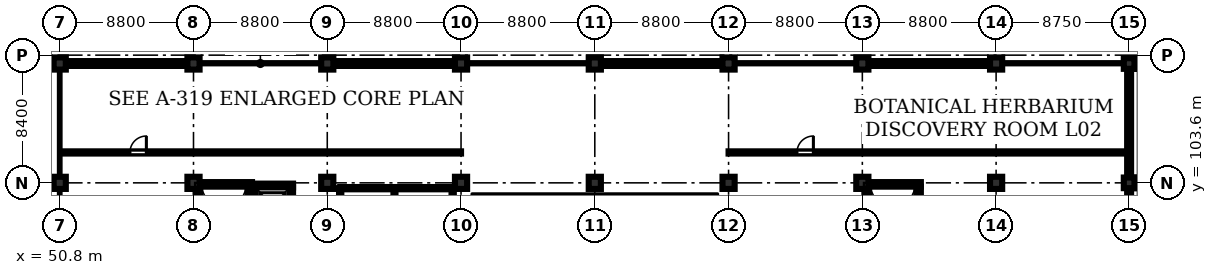
"""IFC4 building model, lengths in metres.
Left out: names, types, materials, properties, quantities, classifications, styles, units other than length and angle.
Written with IfcOpenShell. Run it as: python <this file> out.ifc"""

import sys

from ifc_helpers import new_model, si_unit, direction, frame, frame_2d, origin, origin_2d, place, context, subcontext, project, spatial, rectangle, extrude, element, fill, save


model = new_model("IFC4")
c1 = context("Model", 3, precision=1e-05, world=origin(), true_north=direction((0.0, 1.0)))
c2 = subcontext(c1, "Body", "Model", "MODEL_VIEW")
j1 = project(units=[si_unit("LENGTHUNIT", "METRE"), si_unit("PLANEANGLEUNIT", "RADIAN")], contexts=[c1])
p1 = place(None, origin())
s1 = spatial("IfcSite", under=j1, at=p1, CompositionType="ELEMENT")
p2 = place(p1, origin())
s2 = spatial("IfcBuilding", under=s1, at=p2, CompositionType="ELEMENT")
p3 = place(p2, frame((0.0, 0.0, 5.4)))
s3 = spatial("IfcBuildingStorey", under=s2, at=p3, CompositionType="ELEMENT", Elevation=5.4)
for number, where, z_axis, x_axis in (
    (1, (50.8, 103.6, 0.0), (0.0, 0.0, 1.0), (1.0, 0.0, 0.0)),
    (2, (50.8, 111.45, 0.0), (0.0, 0.0, 1.0), (1.0, 0.0, 0.0)),
    (3, (59.6, 103.6, 0.0), (0.0, 0.0, 1.0), (1.0, 0.0, 0.0)),
    (4, (59.6, 111.45, 0.0), (0.0, 0.0, 1.0), (1.0, 0.0, 0.0)),
    (5, (68.4, 103.6, 0.0), (0.0, 0.0, 1.0), (1.0, 0.0, 0.0)),
    (6, (68.4, 111.45, 0.0), (0.0, 0.0, 1.0), (1.0, 0.0, 0.0)),
    (7, (77.2, 103.6, 0.0), (0.0, 0.0, 1.0), (1.0, 0.0, 0.0)),
    (8, (77.2, 111.45, 0.0), (0.0, 0.0, 1.0), (1.0, 0.0, 0.0)),
    (9, (86.0, 103.6, 0.0), (0.0, 0.0, 1.0), (1.0, 0.0, 0.0)),
    (10, (86.0, 111.45, 0.0), (0.0, 0.0, 1.0), (1.0, 0.0, 0.0)),
    (11, (94.8, 103.6, 0.0), (0.0, 0.0, 1.0), (1.0, 0.0, 0.0)),
    (12, (94.8, 111.45, 0.0), (0.0, 0.0, 1.0), (1.0, 0.0, 0.0)),
    (13, (103.6, 103.6, 0.0), (0.0, 0.0, 1.0), (1.0, 0.0, 0.0)),
    (14, (103.6, 111.45, 0.0), (0.0, 0.0, 1.0), (1.0, 0.0, 0.0)),
    (15, (112.4, 103.6, 0.0), (0.0, 0.0, 1.0), (1.0, 0.0, 0.0)),
    (16, (112.4, 111.45, 0.0), (0.0, 0.0, 1.0), (1.0, 0.0, 0.0)),
):
    element("IfcColumn", number, at=place(p3, frame(where, z_axis=z_axis, x_axis=x_axis)), inside=s3, PredefinedType="COLUMN", context=c2, shape_type="SweptSolid", body=[
        extrude(rectangle(XDim=0.8, YDim=0.8, at=origin_2d()), origin(), (0.0, 0.0, 1.0), 4.58),
    ])
for number, where, z_axis, x_axis in (
    (17, (121.15, 103.6, 0.0), (0.0, 0.0, 1.0), (1.0, 0.0, 0.0)),
    (18, (121.15, 111.45, 0.0), (0.0, 0.0, 1.0), (1.0, 0.0, 0.0)),
    (19, (122.0, 103.6, 0.0), (0.0, 0.0, 1.0), (1.0, 0.0, 0.0)),
    (20, (122.0, 111.45, 0.0), (0.0, 0.0, 1.0), (1.0, 0.0, 0.0)),
):
    element("IfcColumn", number, at=place(p3, frame(where, z_axis=z_axis, x_axis=x_axis)), inside=s3, PredefinedType="COLUMN", context=c2, shape_type="SweptSolid", body=[
        extrude(rectangle(XDim=0.7, YDim=0.7, at=origin_2d()), origin(), (0.0, 0.0, 1.0), 4.58),
    ])
p4 = place(p3, frame((59.75, 103.5, 0.0), z_axis=(0.0, 0.0, 1.0), x_axis=(1.0, 0.0, 0.0)))
e21 = element("IfcWall", 21, at=p4, inside=s3, PredefinedType="SHEAR", context=c2, shape_type="SweptSolid", body=[
    extrude(rectangle(XDim=3.7, YDim=0.3, at=frame_2d((1.85, 0.0))), origin(), (0.0, 0.0, 1.0), 4.58),
])
for number, where, z_axis, x_axis in (
    (22, (59.9, 95.45, 0.0), (0.0, 0.0, 1.0), (0.0, 1.0, 0.0)),
    (23, (63.3, 95.45, 0.0), (0.0, 0.0, 1.0), (0.0, 1.0, 0.0)),
):
    element("IfcWall", number, at=place(p3, frame(where, z_axis=z_axis, x_axis=x_axis)), inside=s3, PredefinedType="SHEAR", context=c2, shape_type="SweptSolid", body=[
        extrude(rectangle(XDim=7.9, YDim=0.3, at=frame_2d((3.95, 0.0))), origin(), (0.0, 0.0, 1.0), 4.58),
    ])
p5 = place(p3, frame((103.75, 103.5, 0.0), z_axis=(0.0, 0.0, 1.0), x_axis=(1.0, 0.0, 0.0)))
e24 = element("IfcWall", 24, at=p5, inside=s3, PredefinedType="SHEAR", context=c2, shape_type="SweptSolid", body=[
    extrude(rectangle(XDim=3.7, YDim=0.3, at=frame_2d((1.85, 0.0))), origin(), (0.0, 0.0, 1.0), 4.58),
])
for number, where, z_axis, x_axis in (
    (25, (103.9, 95.45, 0.0), (0.0, 0.0, 1.0), (0.0, 1.0, 0.0)),
    (26, (107.3, 95.45, 0.0), (0.0, 0.0, 1.0), (0.0, 1.0, 0.0)),
):
    element("IfcWall", number, at=place(p3, frame(where, z_axis=z_axis, x_axis=x_axis)), inside=s3, PredefinedType="SHEAR", context=c2, shape_type="SweptSolid", body=[
        extrude(rectangle(XDim=7.9, YDim=0.3, at=frame_2d((3.95, 0.0))), origin(), (0.0, 0.0, 1.0), 4.58),
    ])
p6 = place(p3, frame((63.45, 103.425, 0.0), z_axis=(0.0, 0.0, 1.0), x_axis=(1.0, 0.0, 0.0)))
e27 = element("IfcWall", 27, at=p6, inside=s3, PredefinedType="SHEAR", context=c2, shape_type="SweptSolid", body=[
    extrude(rectangle(XDim=2.7, YDim=0.25, at=frame_2d((1.35, 0.0))), origin(), (0.0, 0.0, 1.0), 4.58),
])
for number, where, z_axis, x_axis in (
    (28, (63.575, 100.8, 0.0), (0.0, 0.0, 1.0), (0.0, 1.0, 0.0)),
    (29, (66.025, 100.8, 0.0), (0.0, 0.0, 1.0), (0.0, 1.0, 0.0)),
):
    element("IfcWall", number, at=place(p3, frame(where, z_axis=z_axis, x_axis=x_axis)), inside=s3, PredefinedType="SHEAR", context=c2, shape_type="SweptSolid", body=[
        extrude(rectangle(XDim=2.5, YDim=0.25, at=frame_2d((1.25, 0.0))), origin(), (0.0, 0.0, 1.0), 4.58),
    ])
p7 = place(p3, frame((51.2, 111.45, 0.0), z_axis=(0.0, 0.0, 1.0), x_axis=(1.0, 0.0, 0.0)))
e30 = element("IfcWall", 30, at=p7, inside=s3, PredefinedType="STANDARD", context=c2, shape_type="SweptSolid", body=[
    extrude(rectangle(XDim=8.0, YDim=0.32, at=frame_2d((4.0, 0.0))), origin(), (0.0, 0.0, 1.0), 3.83),
])
p8 = place(p7, frame((1.1, 0.0, 0.9)))
e31 = element("IfcOpeningElement", 31, at=p8, cuts=e30, PredefinedType="OPENING", context=c2, shape_type="SweptSolid", body=[
    extrude(rectangle(XDim=2.4, YDim=2.2, at=frame_2d((1.2, 1.1))), frame((0.0, 0.17, 0.0), z_axis=(0.0, -1.0, 0.0), x_axis=(1.0, 0.0, 0.0)), (0.0, 0.0, 1.0), 0.34),
])
p9 = place(p7, frame((4.7, 0.0, 0.9)))
e32 = element("IfcOpeningElement", 32, at=p9, cuts=e30, PredefinedType="OPENING", context=c2, shape_type="SweptSolid", body=[
    extrude(rectangle(XDim=2.4, YDim=2.2, at=frame_2d((1.2, 1.1))), frame((0.0, 0.17, 0.0), z_axis=(0.0, -1.0, 0.0), x_axis=(1.0, 0.0, 0.0)), (0.0, 0.0, 1.0), 0.34),
])
p10 = place(p3, frame((68.8, 111.45, 0.0), z_axis=(0.0, 0.0, 1.0), x_axis=(1.0, 0.0, 0.0)))
e33 = element("IfcWall", 33, at=p10, inside=s3, PredefinedType="STANDARD", context=c2, shape_type="SweptSolid", body=[
    extrude(rectangle(XDim=8.0, YDim=0.32, at=frame_2d((4.0, 0.0))), origin(), (0.0, 0.0, 1.0), 3.83),
])
p11 = place(p10, frame((1.1, 0.0, 0.9)))
e34 = element("IfcOpeningElement", 34, at=p11, cuts=e33, PredefinedType="OPENING", context=c2, shape_type="SweptSolid", body=[
    extrude(rectangle(XDim=2.4, YDim=2.2, at=frame_2d((1.2, 1.1))), frame((0.0, 0.17, 0.0), z_axis=(0.0, -1.0, 0.0), x_axis=(1.0, 0.0, 0.0)), (0.0, 0.0, 1.0), 0.34),
])
p12 = place(p10, frame((4.7, 0.0, 0.9)))
e35 = element("IfcOpeningElement", 35, at=p12, cuts=e33, PredefinedType="OPENING", context=c2, shape_type="SweptSolid", body=[
    extrude(rectangle(XDim=2.4, YDim=2.2, at=frame_2d((1.2, 1.1))), frame((0.0, 0.17, 0.0), z_axis=(0.0, -1.0, 0.0), x_axis=(1.0, 0.0, 0.0)), (0.0, 0.0, 1.0), 0.34),
])
p13 = place(p3, frame((86.4, 111.45, 0.0), z_axis=(0.0, 0.0, 1.0), x_axis=(1.0, 0.0, 0.0)))
e36 = element("IfcWall", 36, at=p13, inside=s3, PredefinedType="STANDARD", context=c2, shape_type="SweptSolid", body=[
    extrude(rectangle(XDim=8.0, YDim=0.32, at=frame_2d((4.0, 0.0))), origin(), (0.0, 0.0, 1.0), 3.83),
])
p14 = place(p13, frame((1.1, 0.0, 0.9)))
e37 = element("IfcOpeningElement", 37, at=p14, cuts=e36, PredefinedType="OPENING", context=c2, shape_type="SweptSolid", body=[
    extrude(rectangle(XDim=2.4, YDim=2.2, at=frame_2d((1.2, 1.1))), frame((0.0, 0.17, 0.0), z_axis=(0.0, -1.0, 0.0), x_axis=(1.0, 0.0, 0.0)), (0.0, 0.0, 1.0), 0.34),
])
p15 = place(p13, frame((4.7, 0.0, 0.9)))
e38 = element("IfcOpeningElement", 38, at=p15, cuts=e36, PredefinedType="OPENING", context=c2, shape_type="SweptSolid", body=[
    extrude(rectangle(XDim=2.4, YDim=2.2, at=frame_2d((1.2, 1.1))), frame((0.0, 0.17, 0.0), z_axis=(0.0, -1.0, 0.0), x_axis=(1.0, 0.0, 0.0)), (0.0, 0.0, 1.0), 0.34),
])
p16 = place(p3, frame((104.0, 111.45, 0.0), z_axis=(0.0, 0.0, 1.0), x_axis=(1.0, 0.0, 0.0)))
e39 = element("IfcWall", 39, at=p16, inside=s3, PredefinedType="STANDARD", context=c2, shape_type="SweptSolid", body=[
    extrude(rectangle(XDim=8.0, YDim=0.32, at=frame_2d((4.0, 0.0))), origin(), (0.0, 0.0, 1.0), 3.83),
])
p17 = place(p16, frame((1.1, 0.0, 0.9)))
e40 = element("IfcOpeningElement", 40, at=p17, cuts=e39, PredefinedType="OPENING", context=c2, shape_type="SweptSolid", body=[
    extrude(rectangle(XDim=2.4, YDim=2.2, at=frame_2d((1.2, 1.1))), frame((0.0, 0.17, 0.0), z_axis=(0.0, -1.0, 0.0), x_axis=(1.0, 0.0, 0.0)), (0.0, 0.0, 1.0), 0.34),
])
p18 = place(p16, frame((4.7, 0.0, 0.9)))
e41 = element("IfcOpeningElement", 41, at=p18, cuts=e39, PredefinedType="OPENING", context=c2, shape_type="SweptSolid", body=[
    extrude(rectangle(XDim=2.4, YDim=2.2, at=frame_2d((1.2, 1.1))), frame((0.0, 0.17, 0.0), z_axis=(0.0, -1.0, 0.0), x_axis=(1.0, 0.0, 0.0)), (0.0, 0.0, 1.0), 0.34),
])
p19 = place(p3, frame((121.15, 103.25, 0.0), z_axis=(0.0, 0.0, 1.0), x_axis=(0.0, -1.0, 0.0)))
e42 = element("IfcWall", 42, at=p19, inside=s3, PredefinedType="STANDARD", context=c2, shape_type="SweptSolid", body=[
    extrude(rectangle(XDim=7.7, YDim=0.26, at=frame_2d((3.85, 0.0))), origin(), (0.0, 0.0, 1.0), 3.93),
])
p20 = place(p3, frame((121.15, 111.1, 0.0), z_axis=(0.0, 0.0, 1.0), x_axis=(0.0, -1.0, 0.0)))
e43 = element("IfcWall", 43, at=p20, inside=s3, PredefinedType="STANDARD", context=c2, shape_type="SweptSolid", body=[
    extrude(rectangle(XDim=7.15, YDim=0.26, at=frame_2d((3.575, 0.0))), origin(), (0.0, 0.0, 1.0), 3.93),
])
p21 = place(p3, frame((69.25, 94.68, 0.0), z_axis=(0.0, 0.0, 1.0), x_axis=(0.0, 1.0, 0.0)))
e44 = element("IfcWall", 44, at=p21, inside=s3, PredefinedType="PARTITIONING", context=c2, shape_type="SweptSolid", body=[
    extrude(rectangle(XDim=8.57, YDim=0.15, at=frame_2d((4.285, 0.0))), origin(), (0.0, 0.0, 1.0), 4.58),
])
p22 = place(p3, frame((72.82, 94.68, 0.0), z_axis=(0.0, 0.0, 1.0), x_axis=(0.0, 1.0, 0.0)))
e45 = element("IfcWall", 45, at=p22, inside=s3, PredefinedType="PARTITIONING", context=c2, shape_type="SweptSolid", body=[
    extrude(rectangle(XDim=8.57, YDim=0.135, at=frame_2d((4.285, 0.0))), origin(), (0.0, 0.0, 1.0), 4.24),
])
p23 = place(p3, frame((69.25, 103.25, 0.0), z_axis=(0.0, 0.0, 1.0), x_axis=(1.0, 0.0, 0.0)))
e46 = element("IfcWall", 46, at=p23, inside=s3, PredefinedType="PARTITIONING", context=c2, shape_type="SweptSolid", body=[
    extrude(rectangle(XDim=7.4, YDim=0.15, at=frame_2d((3.7, 0.0))), origin(), (0.0, 0.0, 1.0), 4.58),
])
p24 = place(p3, frame((76.65, 94.68, 0.0), z_axis=(0.0, 0.0, 1.0), x_axis=(0.0, 1.0, 0.0)))
e47 = element("IfcWall", 47, at=p24, inside=s3, PredefinedType="PARTITIONING", context=c2, shape_type="SweptSolid", body=[
    extrude(rectangle(XDim=8.57, YDim=0.15, at=frame_2d((4.285, 0.0))), origin(), (0.0, 0.0, 1.0), 4.58),
])
p25 = place(p3, frame((50.92, 105.6, 0.0), z_axis=(0.0, 0.0, 1.0), x_axis=(1.0, 0.0, 0.0)))
e48 = element("IfcWall", 48, at=p25, inside=s3, PredefinedType="PARTITIONING", context=c2, shape_type="SweptSolid", body=[
    extrude(rectangle(XDim=26.28, YDim=0.145, at=frame_2d((13.14, 0.0))), origin(), (0.0, 0.0, 1.0), 4.58),
])
p26 = place(p25, frame((4.5, 0.0, 0.0)))
e49 = element("IfcOpeningElement", 49, at=p26, cuts=e48, PredefinedType="OPENING", context=c2, shape_type="SweptSolid", body=[
    extrude(rectangle(XDim=1.08, YDim=2.15, at=frame_2d((0.54, 1.075))), frame((0.0, 0.083, 0.0), z_axis=(0.0, -1.0, 0.0), x_axis=(1.0, 0.0, 0.0)), (0.0, 0.0, 1.0), 0.165),
])
p27 = place(p3, frame((94.8, 105.6, 0.0), z_axis=(0.0, 0.0, 1.0), x_axis=(1.0, 0.0, 0.0)))
e50 = element("IfcWall", 50, at=p27, inside=s3, PredefinedType="PARTITIONING", context=c2, shape_type="SweptSolid", body=[
    extrude(rectangle(XDim=26.22, YDim=0.145, at=frame_2d((13.11, 0.0))), origin(), (0.0, 0.0, 1.0), 4.58),
])
p28 = place(p27, frame((4.5, 0.0, 0.0)))
e51 = element("IfcOpeningElement", 51, at=p28, cuts=e50, PredefinedType="OPENING", context=c2, shape_type="SweptSolid", body=[
    extrude(rectangle(XDim=1.08, YDim=2.15, at=frame_2d((0.54, 1.075))), frame((0.0, 0.083, 0.0), z_axis=(0.0, -1.0, 0.0), x_axis=(1.0, 0.0, 0.0)), (0.0, 0.0, 1.0), 0.165),
])
p29 = place(p8, origin())
e52 = element("IfcWindow", 52, at=p29, inside=s3, PartitioningType="TRIPLE_PANEL_VERTICAL", PredefinedType="WINDOW", context=c2, shape_type="SweptSolid", body=[
    extrude(rectangle(XDim=2.4, YDim=2.2, at=frame_2d((1.2, 1.1))), frame((0.0, 0.03, 0.0), z_axis=(0.0, -1.0, 0.0), x_axis=(1.0, 0.0, 0.0)), (0.0, 0.0, 1.0), 0.06),
])
fill(e31, e52)
p30 = place(p9, origin())
e53 = element("IfcWindow", 53, at=p30, inside=s3, PartitioningType="TRIPLE_PANEL_VERTICAL", PredefinedType="WINDOW", context=c2, shape_type="SweptSolid", body=[
    extrude(rectangle(XDim=2.4, YDim=2.2, at=frame_2d((1.2, 1.1))), frame((0.0, 0.03, 0.0), z_axis=(0.0, -1.0, 0.0), x_axis=(1.0, 0.0, 0.0)), (0.0, 0.0, 1.0), 0.06),
])
fill(e32, e53)
p31 = place(p11, origin())
e54 = element("IfcWindow", 54, at=p31, inside=s3, PartitioningType="TRIPLE_PANEL_VERTICAL", PredefinedType="WINDOW", context=c2, shape_type="SweptSolid", body=[
    extrude(rectangle(XDim=2.4, YDim=2.2, at=frame_2d((1.2, 1.1))), frame((0.0, 0.03, 0.0), z_axis=(0.0, -1.0, 0.0), x_axis=(1.0, 0.0, 0.0)), (0.0, 0.0, 1.0), 0.06),
])
fill(e34, e54)
p32 = place(p12, origin())
e55 = element("IfcWindow", 55, at=p32, inside=s3, PartitioningType="TRIPLE_PANEL_VERTICAL", PredefinedType="WINDOW", context=c2, shape_type="SweptSolid", body=[
    extrude(rectangle(XDim=2.4, YDim=2.2, at=frame_2d((1.2, 1.1))), frame((0.0, 0.03, 0.0), z_axis=(0.0, -1.0, 0.0), x_axis=(1.0, 0.0, 0.0)), (0.0, 0.0, 1.0), 0.06),
])
fill(e35, e55)
p33 = place(p14, origin())
e56 = element("IfcWindow", 56, at=p33, inside=s3, PartitioningType="TRIPLE_PANEL_VERTICAL", PredefinedType="WINDOW", context=c2, shape_type="SweptSolid", body=[
    extrude(rectangle(XDim=2.4, YDim=2.2, at=frame_2d((1.2, 1.1))), frame((0.0, 0.03, 0.0), z_axis=(0.0, -1.0, 0.0), x_axis=(1.0, 0.0, 0.0)), (0.0, 0.0, 1.0), 0.06),
])
fill(e37, e56)
p34 = place(p15, origin())
e57 = element("IfcWindow", 57, at=p34, inside=s3, PartitioningType="TRIPLE_PANEL_VERTICAL", PredefinedType="WINDOW", context=c2, shape_type="SweptSolid", body=[
    extrude(rectangle(XDim=2.4, YDim=2.2, at=frame_2d((1.2, 1.1))), frame((0.0, 0.03, 0.0), z_axis=(0.0, -1.0, 0.0), x_axis=(1.0, 0.0, 0.0)), (0.0, 0.0, 1.0), 0.06),
])
fill(e38, e57)
p35 = place(p17, origin())
e58 = element("IfcWindow", 58, at=p35, inside=s3, PartitioningType="TRIPLE_PANEL_VERTICAL", PredefinedType="WINDOW", context=c2, shape_type="SweptSolid", body=[
    extrude(rectangle(XDim=2.4, YDim=2.2, at=frame_2d((1.2, 1.1))), frame((0.0, 0.03, 0.0), z_axis=(0.0, -1.0, 0.0), x_axis=(1.0, 0.0, 0.0)), (0.0, 0.0, 1.0), 0.06),
])
fill(e40, e58)
p36 = place(p18, origin())
e59 = element("IfcWindow", 59, at=p36, inside=s3, PartitioningType="TRIPLE_PANEL_VERTICAL", PredefinedType="WINDOW", context=c2, shape_type="SweptSolid", body=[
    extrude(rectangle(XDim=2.4, YDim=2.2, at=frame_2d((1.2, 1.1))), frame((0.0, 0.03, 0.0), z_axis=(0.0, -1.0, 0.0), x_axis=(1.0, 0.0, 0.0)), (0.0, 0.0, 1.0), 0.06),
])
fill(e41, e59)
p37 = place(p26, origin())
e60 = element("IfcDoor", 60, at=p37, inside=s3, OperationType="SINGLE_SWING_RIGHT", PredefinedType="DOOR", context=c2, shape_type="SweptSolid", body=[
    extrude(rectangle(XDim=1.08, YDim=2.15, at=frame_2d((0.54, 1.075))), frame((0.0, 0.025, 0.0), z_axis=(0.0, -1.0, 0.0), x_axis=(1.0, 0.0, 0.0)), (0.0, 0.0, 1.0), 0.05),
])
fill(e49, e60)
p38 = place(p28, origin())
e61 = element("IfcDoor", 61, at=p38, inside=s3, OperationType="SINGLE_SWING_RIGHT", PredefinedType="DOOR", context=c2, shape_type="SweptSolid", body=[
    extrude(rectangle(XDim=1.08, YDim=2.15, at=frame_2d((0.54, 1.075))), frame((0.0, 0.025, 0.0), z_axis=(0.0, -1.0, 0.0), x_axis=(1.0, 0.0, 0.0)), (0.0, 0.0, 1.0), 0.05),
])
fill(e51, e61)
save(model, sys.argv[1])
